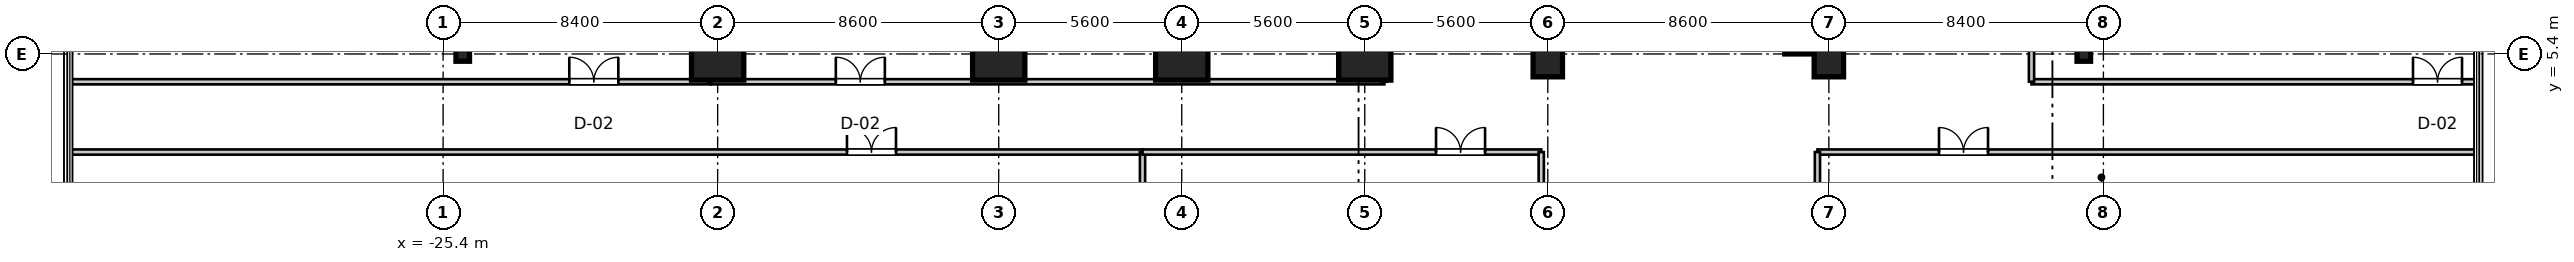
"""IFC4 building model, lengths in metres.
Left out: names, types, materials, properties, quantities, classifications, styles, units other than length and angle.
Written with IfcOpenShell. Run it as: python <this file> out.ifc"""

import sys

from ifc_helpers import new_model, si_unit, direction, frame, frame_2d, origin, origin_2d, place, context, subcontext, project, spatial, rectangle, i_section, extrude, source, transform, mapped, element, fill, save


model = new_model("IFC4")
c1 = context("Model", 3, precision=1e-05, world=origin(), true_north=direction((0.0, 1.0)))
c2 = subcontext(c1, "Body", "Model", "MODEL_VIEW")
j1 = project(units=[si_unit("LENGTHUNIT", "METRE"), si_unit("PLANEANGLEUNIT", "RADIAN")], contexts=[c1])
p1 = place(None, origin())
s1 = spatial("IfcSite", under=j1, at=p1, CompositionType="ELEMENT")
p2 = place(p1, origin())
s2 = spatial("IfcBuilding", under=s1, at=p2, CompositionType="ELEMENT")
p3 = place(p2, frame((0.0, 0.0, 10.8)))
s3 = spatial("IfcBuildingStorey", under=s2, at=p3, CompositionType="ELEMENT", Elevation=10.8)
m1 = source(origin(), c2, "Body", "SweptSolid", [
    extrude(rectangle(XDim=1.6, YDim=1.6, at=origin_2d()), origin(), (0.0, 0.0, 1.0), 5.355),
])
for number, where, z_axis, x_axis in (
    (1, (-17.0, 5.4, 0.0), (0.0, 0.0, 1.0), (1.0, 0.0, 0.0)),
    (2, (-8.4, 5.4, 0.0), (0.0, 0.0, 1.0), (1.0, 0.0, 0.0)),
    (3, (-2.8, 5.4, 0.0), (0.0, 0.0, 1.0), (1.0, 0.0, 0.0)),
    (4, (2.8, 5.4, 0.0), (0.0, 0.0, 1.0), (1.0, 0.0, 0.0)),
):
    element("IfcColumn", number, at=place(p3, frame(where, z_axis=z_axis, x_axis=x_axis)), inside=s3, PredefinedType="COLUMN", context=c2, shape_type="MappedRepresentation", body=[
        mapped(m1, transform((0.0, 0.0, 0.0), scale=1.0)),
    ])
m2 = source(origin(), c2, "Body", "SweptSolid", [
    extrude(rectangle(XDim=0.9, YDim=1.4, at=origin_2d()), origin(), (0.0, 0.0, 1.0), 5.355),
])
for number, where, z_axis, x_axis in (
    (5, (8.4, 5.4, 0.0), (0.0, 0.0, 1.0), (1.0, 0.0, 0.0)),
    (6, (17.0, 5.4, 0.0), (0.0, 0.0, 1.0), (1.0, 0.0, 0.0)),
):
    element("IfcColumn", number, at=place(p3, frame(where, z_axis=z_axis, x_axis=x_axis)), inside=s3, PredefinedType="PILASTER", context=c2, shape_type="MappedRepresentation", body=[
        mapped(m2, transform((0.0, 0.0, 0.0), scale=1.0)),
    ])
m3 = source(origin(), c2, "Body", "SweptSolid", [
    extrude(i_section(OverallWidth=0.416, OverallDepth=0.446, WebThickness=0.025, FlangeThickness=0.04, at=origin_2d()), origin(), (0.0, 0.0, 1.0), 5.355),
])
for number, where, z_axis, x_axis in (
    (7, (-24.8, 5.4, 0.0), (0.0, 0.0, 1.0), (1.0, 0.0, 0.0)),
    (8, (24.8, 5.4, 0.0), (0.0, 0.0, 1.0), (1.0, 0.0, 0.0)),
):
    element("IfcColumn", number, at=place(p3, frame(where, z_axis=z_axis, x_axis=x_axis)), inside=s3, PredefinedType="COLUMN", context=c2, shape_type="MappedRepresentation", body=[
        mapped(m3, transform((0.0, 0.0, 0.0), scale=1.0)),
    ])
m4 = source(origin(), c2, "Body", "SweptSolid", [
    extrude(rectangle(XDim=11.6, YDim=0.8, at=frame_2d((5.8, 0.0))), origin(), (0.0, 0.0, 1.0), 5.06),
])
p4 = place(p3, frame((16.05, 5.4, 0.0), z_axis=(0.0, 0.0, 1.0), x_axis=(0.0, 1.0, 0.0)))
e9 = element("IfcWall", 9, at=p4, inside=s3, PredefinedType="SHEAR", context=c2, shape_type="MappedRepresentation", body=[
    mapped(m4, transform((0.0, 0.0, 0.0), scale=1.0)),
])
m5 = source(origin(), c2, "Body", "SweptSolid", [
    extrude(rectangle(XDim=19.56, YDim=0.16, at=frame_2d((9.78, 0.0))), origin(), (0.0, 0.0, 1.0), 3.4),
])
p5 = place(p3, frame((-36.76, 4.55, 0.0), z_axis=(0.0, 0.0, 1.0), x_axis=(1.0, 0.0, 0.0)))
e10 = element("IfcWall", 10, at=p5, inside=s3, PredefinedType="PARTITIONING", context=c2, shape_type="MappedRepresentation", body=[
    mapped(m5, transform((0.0, 0.0, 0.0), scale=1.0)),
])
p6 = place(p5, frame((15.221, 0.0, 0.0)))
e11 = element("IfcOpeningElement", 11, at=p6, cuts=e10, PredefinedType="OPENING", context=c2, shape_type="SweptSolid", body=[
    extrude(rectangle(XDim=1.5, YDim=2.15, at=frame_2d((0.75, 1.075))), frame((0.0, 0.09, 0.0), z_axis=(0.0, -1.0, 0.0), x_axis=(1.0, 0.0, 0.0)), (0.0, 0.0, 1.0), 0.18),
])
m6 = source(origin(), c2, "Body", "SweptSolid", [
    extrude(rectangle(XDim=19.21, YDim=0.16, at=frame_2d((9.605, 0.0))), origin(), (0.0, 0.0, 1.0), 3.4),
])
p7 = place(p3, frame((-17.2, 4.55, 0.0), z_axis=(0.0, 0.0, 1.0), x_axis=(0.0, 1.0, 0.0)))
e12 = element("IfcWall", 12, at=p7, inside=s3, PredefinedType="PARTITIONING", context=c2, shape_type="MappedRepresentation", body=[
    mapped(m6, transform((0.0, 0.0, 0.0), scale=1.0)),
])
m7 = source(origin(), c2, "Body", "SweptSolid", [
    extrude(rectangle(XDim=20.6, YDim=0.16, at=frame_2d((10.3, 0.0))), origin(), (0.0, 0.0, 1.0), 3.4),
])
p8 = place(p3, frame((-17.2, 4.55, 0.0), z_axis=(0.0, 0.0, 1.0), x_axis=(1.0, 0.0, 0.0)))
e13 = element("IfcWall", 13, at=p8, inside=s3, PredefinedType="PARTITIONING", context=c2, shape_type="MappedRepresentation", body=[
    mapped(m7, transform((0.0, 0.0, 0.0), scale=1.0)),
])
p9 = place(p8, frame((3.816, 0.0, 0.0)))
e14 = element("IfcOpeningElement", 14, at=p9, cuts=e13, PredefinedType="OPENING", context=c2, shape_type="SweptSolid", body=[
    extrude(rectangle(XDim=1.5, YDim=2.15, at=frame_2d((0.75, 1.075))), frame((0.0, 0.09, 0.0), z_axis=(0.0, -1.0, 0.0), x_axis=(1.0, 0.0, 0.0)), (0.0, 0.0, 1.0), 0.18),
])
p10 = place(p3, frame((3.4, 4.55, 0.0), z_axis=(0.0, 0.0, 1.0), x_axis=(0.0, 1.0, 0.0)))
e15 = element("IfcWall", 15, at=p10, inside=s3, PredefinedType="PARTITIONING", context=c2, shape_type="MappedRepresentation", body=[
    mapped(m6, transform((0.0, 0.0, 0.0), scale=1.0)),
])
m8 = source(origin(), c2, "Body", "SweptSolid", [
    extrude(rectangle(XDim=13.56, YDim=0.16, at=frame_2d((6.78, 0.0))), origin(), (0.0, 0.0, 1.0), 3.4),
])
p11 = place(p3, frame((23.2, 4.55, 0.0), z_axis=(0.0, 0.0, 1.0), x_axis=(1.0, 0.0, 0.0)))
e16 = element("IfcWall", 16, at=p11, inside=s3, PredefinedType="PARTITIONING", context=c2, shape_type="MappedRepresentation", body=[
    mapped(m8, transform((0.0, 0.0, 0.0), scale=1.0)),
])
p12 = place(p11, frame((11.673, 0.0, 0.0)))
e17 = element("IfcOpeningElement", 17, at=p12, cuts=e16, PredefinedType="OPENING", context=c2, shape_type="SweptSolid", body=[
    extrude(rectangle(XDim=1.5, YDim=2.15, at=frame_2d((0.75, 1.075))), frame((0.0, 0.09, 0.0), z_axis=(0.0, -1.0, 0.0), x_axis=(1.0, 0.0, 0.0)), (0.0, 0.0, 1.0), 0.18),
])
p13 = place(p3, frame((23.2, 4.55, 0.0), z_axis=(0.0, 0.0, 1.0), x_axis=(0.0, 1.0, 0.0)))
e18 = element("IfcWall", 18, at=p13, inside=s3, PredefinedType="PARTITIONING", context=c2, shape_type="MappedRepresentation", body=[
    mapped(m6, transform((0.0, 0.0, 0.0), scale=1.0)),
])
m9 = source(origin(), c2, "Body", "SweptSolid", [
    extrude(rectangle(XDim=32.76, YDim=0.16, at=frame_2d((16.38, 0.0))), origin(), (0.0, 0.0, 1.0), 3.4),
])
p14 = place(p3, frame((-36.76, 2.4, 0.0), z_axis=(0.0, 0.0, 1.0), x_axis=(1.0, 0.0, 0.0)))
e19 = element("IfcWall", 19, at=p14, inside=s3, PredefinedType="PARTITIONING", context=c2, shape_type="MappedRepresentation", body=[
    mapped(m9, transform((0.0, 0.0, 0.0), scale=1.0)),
])
p15 = place(p14, frame((23.717, 0.0, 0.0)))
e20 = element("IfcOpeningElement", 20, at=p15, cuts=e19, PredefinedType="OPENING", context=c2, shape_type="SweptSolid", body=[
    extrude(rectangle(XDim=1.5, YDim=2.15, at=frame_2d((0.75, 1.075))), frame((0.0, 0.09, 0.0), z_axis=(0.0, -1.0, 0.0), x_axis=(1.0, 0.0, 0.0)), (0.0, 0.0, 1.0), 0.18),
])
m10 = source(origin(), c2, "Body", "SweptSolid", [
    extrude(rectangle(XDim=4.8, YDim=0.16, at=frame_2d((2.4, 0.0))), origin(), (0.0, 0.0, 1.0), 3.4),
])
p16 = place(p3, frame((-4.0, -2.4, 0.0), z_axis=(0.0, 0.0, 1.0), x_axis=(0.0, 1.0, 0.0)))
e21 = element("IfcWall", 21, at=p16, inside=s3, PredefinedType="PARTITIONING", context=c2, shape_type="MappedRepresentation", body=[
    mapped(m10, transform((0.0, 0.0, 0.0), scale=1.0)),
])
m11 = source(origin(), c2, "Body", "SweptSolid", [
    extrude(rectangle(XDim=12.2, YDim=0.16, at=frame_2d((6.1, 0.0))), origin(), (0.0, 0.0, 1.0), 3.4),
])
p17 = place(p3, frame((-4.0, 2.4, 0.0), z_axis=(0.0, 0.0, 1.0), x_axis=(1.0, 0.0, 0.0)))
e22 = element("IfcWall", 22, at=p17, inside=s3, PredefinedType="PARTITIONING", context=c2, shape_type="MappedRepresentation", body=[
    mapped(m11, transform((0.0, 0.0, 0.0), scale=1.0)),
])
p18 = place(p17, frame((8.981, 0.0, 0.0)))
e23 = element("IfcOpeningElement", 23, at=p18, cuts=e22, PredefinedType="OPENING", context=c2, shape_type="SweptSolid", body=[
    extrude(rectangle(XDim=1.5, YDim=2.15, at=frame_2d((0.75, 1.075))), frame((0.0, 0.09, 0.0), z_axis=(0.0, -1.0, 0.0), x_axis=(1.0, 0.0, 0.0)), (0.0, 0.0, 1.0), 0.18),
])
p19 = place(p3, frame((8.2, -2.4, 0.0), z_axis=(0.0, 0.0, 1.0), x_axis=(0.0, 1.0, 0.0)))
e24 = element("IfcWall", 24, at=p19, inside=s3, PredefinedType="PARTITIONING", context=c2, shape_type="MappedRepresentation", body=[
    mapped(m10, transform((0.0, 0.0, 0.0), scale=1.0)),
])
m12 = source(origin(), c2, "Body", "SweptSolid", [
    extrude(rectangle(XDim=20.11, YDim=0.16, at=frame_2d((10.055, 0.0))), origin(), (0.0, 0.0, 1.0), 3.4),
])
p20 = place(p3, frame((16.65, 2.4, 0.0), z_axis=(0.0, 0.0, 1.0), x_axis=(1.0, 0.0, 0.0)))
e25 = element("IfcWall", 25, at=p20, inside=s3, PredefinedType="PARTITIONING", context=c2, shape_type="MappedRepresentation", body=[
    mapped(m12, transform((0.0, 0.0, 0.0), scale=1.0)),
])
p21 = place(p20, frame((3.72, 0.0, 0.0)))
e26 = element("IfcOpeningElement", 26, at=p21, cuts=e25, PredefinedType="OPENING", context=c2, shape_type="SweptSolid", body=[
    extrude(rectangle(XDim=1.5, YDim=2.15, at=frame_2d((0.75, 1.075))), frame((0.0, 0.09, 0.0), z_axis=(0.0, -1.0, 0.0), x_axis=(1.0, 0.0, 0.0)), (0.0, 0.0, 1.0), 0.18),
])
p22 = place(p3, frame((16.65, -2.4, 0.0), z_axis=(0.0, 0.0, 1.0), x_axis=(0.0, 1.0, 0.0)))
e27 = element("IfcWall", 27, at=p22, inside=s3, PredefinedType="PARTITIONING", context=c2, shape_type="MappedRepresentation", body=[
    mapped(m10, transform((0.0, 0.0, 0.0), scale=1.0)),
])
m13 = source(origin(), c2, "Body", "SweptSolid", [
    extrude(rectangle(XDim=1.5, YDim=2.15, at=frame_2d((0.75, 1.075))), frame((0.0, 0.025, 0.0), z_axis=(0.0, -1.0, 0.0), x_axis=(1.0, 0.0, 0.0)), (0.0, 0.0, 1.0), 0.05),
])
p23 = place(p6, origin())
e28 = element("IfcDoor", 28, at=p23, inside=s3, OperationType="DOUBLE_DOOR_SINGLE_SWING", PredefinedType="DOOR", context=c2, shape_type="MappedRepresentation", body=[
    mapped(m13, transform((0.0, 0.0, 0.0), scale=1.0)),
])
fill(e11, e28)
p24 = place(p9, origin())
e29 = element("IfcDoor", 29, at=p24, inside=s3, OperationType="DOUBLE_DOOR_SINGLE_SWING", PredefinedType="DOOR", context=c2, shape_type="MappedRepresentation", body=[
    mapped(m13, transform((0.0, 0.0, 0.0), scale=1.0)),
])
fill(e14, e29)
p25 = place(p12, origin())
e30 = element("IfcDoor", 30, at=p25, inside=s3, OperationType="DOUBLE_DOOR_SINGLE_SWING", PredefinedType="DOOR", context=c2, shape_type="MappedRepresentation", body=[
    mapped(m13, transform((0.0, 0.0, 0.0), scale=1.0)),
])
fill(e17, e30)
p26 = place(p15, frame((1.5, 0.0, 0.0), z_axis=(0.0, 0.0, 1.0), x_axis=(-1.0, 0.0, 0.0)))
e31 = element("IfcDoor", 31, at=p26, inside=s3, OperationType="DOUBLE_DOOR_SINGLE_SWING", PredefinedType="DOOR", context=c2, shape_type="MappedRepresentation", body=[
    mapped(m13, transform((0.0, 0.0, 0.0), scale=1.0)),
])
fill(e20, e31)
p27 = place(p18, frame((1.5, 0.0, 0.0), z_axis=(0.0, 0.0, 1.0), x_axis=(-1.0, 0.0, 0.0)))
e32 = element("IfcDoor", 32, at=p27, inside=s3, OperationType="DOUBLE_DOOR_SINGLE_SWING", PredefinedType="DOOR", context=c2, shape_type="MappedRepresentation", body=[
    mapped(m13, transform((0.0, 0.0, 0.0), scale=1.0)),
])
fill(e23, e32)
p28 = place(p21, frame((1.5, 0.0, 0.0), z_axis=(0.0, 0.0, 1.0), x_axis=(-1.0, 0.0, 0.0)))
e33 = element("IfcDoor", 33, at=p28, inside=s3, OperationType="DOUBLE_DOOR_SINGLE_SWING", PredefinedType="DOOR", context=c2, shape_type="MappedRepresentation", body=[
    mapped(m13, transform((0.0, 0.0, 0.0), scale=1.0)),
])
fill(e26, e33)
save(model, sys.argv[1])
